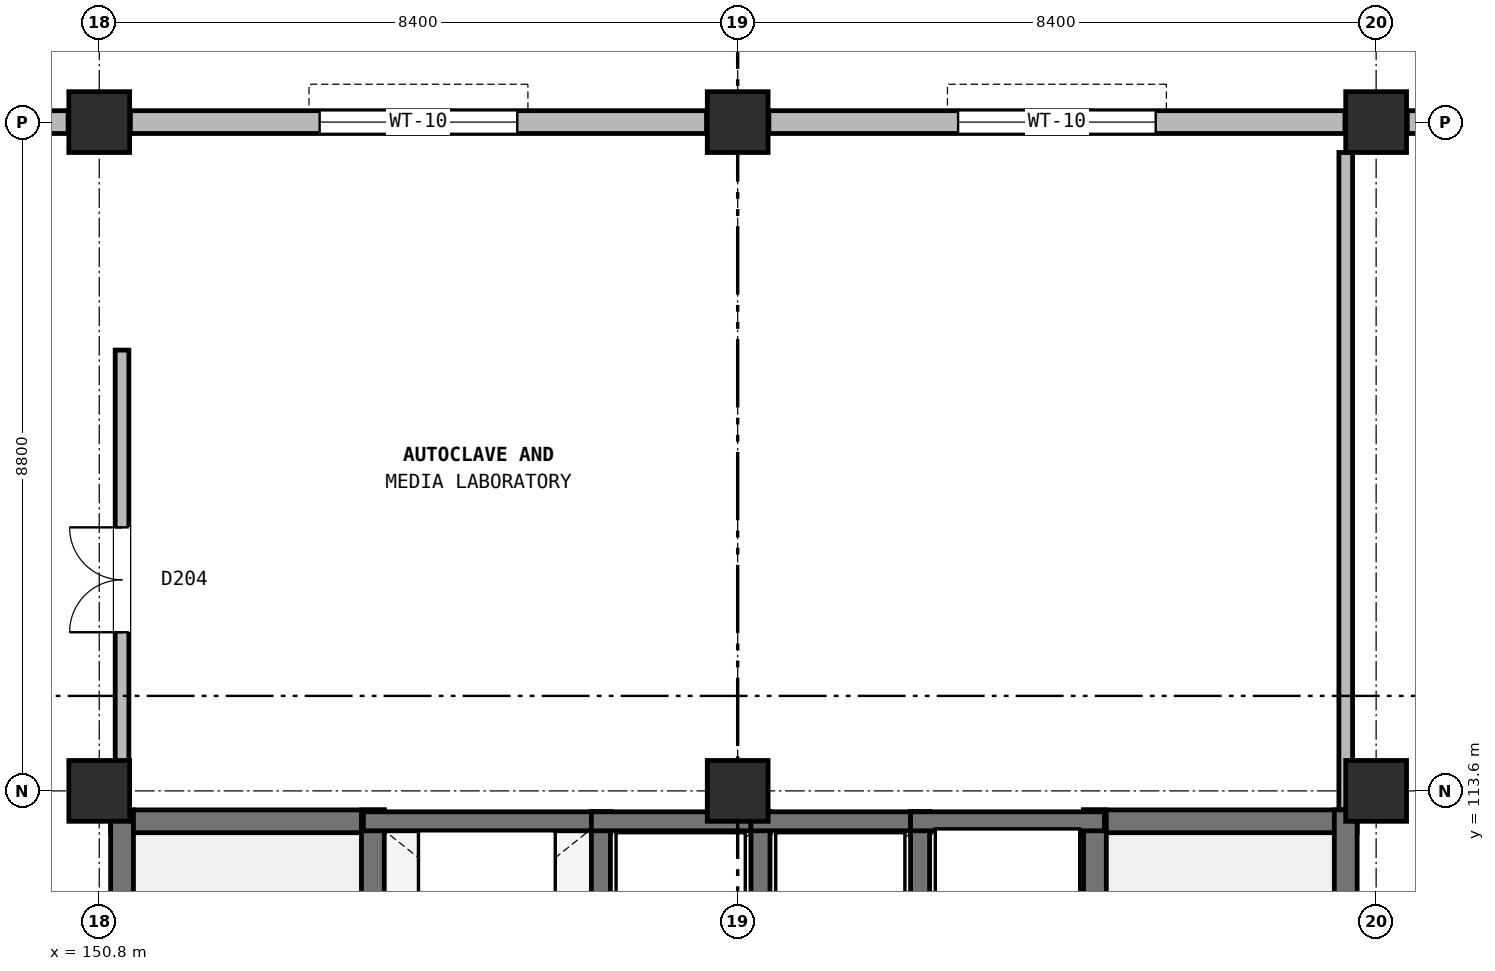
"""IFC4 building model, lengths in metres.
Left out: names, types, materials, properties, quantities, classifications, styles, units other than length and angle.
Written with IfcOpenShell. Run it as: python <this file> out.ifc"""

import sys

from ifc_helpers import new_model, si_unit, direction, frame, frame_2d, origin, origin_2d, place, context, subcontext, project, spatial, rectangle, extrude, element, fill, save


model = new_model("IFC4")
c1 = context("Model", 3, precision=1e-05, world=origin(), true_north=direction((0.0, 1.0)))
c2 = subcontext(c1, "Body", "Model", "MODEL_VIEW")
j1 = project(units=[si_unit("LENGTHUNIT", "METRE"), si_unit("PLANEANGLEUNIT", "RADIAN")], contexts=[c1])
p1 = place(None, origin())
s1 = spatial("IfcSite", under=j1, at=p1, CompositionType="ELEMENT")
p2 = place(p1, origin())
s2 = spatial("IfcBuilding", under=s1, at=p2, CompositionType="ELEMENT")
p3 = place(p2, frame((0.0, 0.0, 17.2)))
s3 = spatial("IfcBuildingStorey", under=s2, at=p3, CompositionType="ELEMENT", Elevation=17.2)
for number, where, z_axis, x_axis in (
    (1, (150.8, 113.6, 0.0), (0.0, 0.0, 1.0), (1.0, 0.0, 0.0)),
    (2, (150.8, 122.4, 0.0), (0.0, 0.0, 1.0), (1.0, 0.0, 0.0)),
    (3, (159.2, 113.6, 0.0), (0.0, 0.0, 1.0), (1.0, 0.0, 0.0)),
    (4, (159.2, 122.4, 0.0), (0.0, 0.0, 1.0), (1.0, 0.0, 0.0)),
    (5, (167.6, 113.6, 0.0), (0.0, 0.0, 1.0), (1.0, 0.0, 0.0)),
    (6, (167.6, 122.4, 0.0), (0.0, 0.0, 1.0), (1.0, 0.0, 0.0)),
):
    element("IfcColumn", number, at=place(p3, frame(where, z_axis=z_axis, x_axis=x_axis)), inside=s3, PredefinedType="COLUMN", context=c2, shape_type="SweptSolid", body=[
        extrude(rectangle(XDim=0.8, YDim=0.8, at=origin_2d()), origin(), (0.0, 0.0, 1.0), 3.8),
    ])
p4 = place(p3, frame((175.59, 122.4, 0.0), z_axis=(0.0, 0.0, 1.0), x_axis=(-1.0, 0.0, 0.0)))
e7 = element("IfcWall", 7, at=p4, inside=s3, PredefinedType="SOLIDWALL", context=c2, shape_type="SweptSolid", body=[
    extrude(rectangle(XDim=7.58, YDim=0.3, at=frame_2d((3.79, 0.0))), origin(), (0.0, 0.0, 1.0), 3.05),
])
p5 = place(p4, frame((0.695, 0.0, 0.9)))
e8 = element("IfcOpeningElement", 8, at=p5, cuts=e7, PredefinedType="OPENING", context=c2, shape_type="SweptSolid", body=[
    extrude(rectangle(XDim=2.6, YDim=2.0, at=frame_2d((1.3, 1.0))), frame((0.0, 0.16, 0.0), z_axis=(0.0, -1.0, 0.0), x_axis=(1.0, 0.0, 0.0)), (0.0, 0.0, 1.0), 0.32),
])
p6 = place(p3, frame((167.19, 122.4, 0.0), z_axis=(0.0, 0.0, 1.0), x_axis=(-1.0, 0.0, 0.0)))
e9 = element("IfcWall", 9, at=p6, inside=s3, PredefinedType="SOLIDWALL", context=c2, shape_type="SweptSolid", body=[
    extrude(rectangle(XDim=7.58, YDim=0.3, at=frame_2d((3.79, 0.0))), origin(), (0.0, 0.0, 1.0), 3.05),
])
p7 = place(p6, frame((2.49, 0.0, 0.9)))
e10 = element("IfcOpeningElement", 10, at=p7, cuts=e9, PredefinedType="OPENING", context=c2, shape_type="SweptSolid", body=[
    extrude(rectangle(XDim=2.6, YDim=2.0, at=frame_2d((1.3, 1.0))), frame((0.0, 0.16, 0.0), z_axis=(0.0, -1.0, 0.0), x_axis=(1.0, 0.0, 0.0)), (0.0, 0.0, 1.0), 0.32),
])
p8 = place(p3, frame((158.79, 122.4, 0.0), z_axis=(0.0, 0.0, 1.0), x_axis=(-1.0, 0.0, 0.0)))
e11 = element("IfcWall", 11, at=p8, inside=s3, PredefinedType="SOLIDWALL", context=c2, shape_type="SweptSolid", body=[
    extrude(rectangle(XDim=7.58, YDim=0.3, at=frame_2d((3.79, 0.0))), origin(), (0.0, 0.0, 1.0), 3.05),
])
p9 = place(p8, frame((2.49, 0.0, 0.9)))
e12 = element("IfcOpeningElement", 12, at=p9, cuts=e11, PredefinedType="OPENING", context=c2, shape_type="SweptSolid", body=[
    extrude(rectangle(XDim=2.6, YDim=2.0, at=frame_2d((1.3, 1.0))), frame((0.0, 0.16, 0.0), z_axis=(0.0, -1.0, 0.0), x_axis=(1.0, 0.0, 0.0)), (0.0, 0.0, 1.0), 0.32),
])
p10 = place(p3, frame((150.39, 122.4, 0.0), z_axis=(0.0, 0.0, 1.0), x_axis=(-1.0, 0.0, 0.0)))
e13 = element("IfcWall", 13, at=p10, inside=s3, PredefinedType="SOLIDWALL", context=c2, shape_type="SweptSolid", body=[
    extrude(rectangle(XDim=7.58, YDim=0.3, at=frame_2d((3.79, 0.0))), origin(), (0.0, 0.0, 1.0), 3.05),
])
p11 = place(p10, frame((2.49, 0.0, 0.9)))
e14 = element("IfcOpeningElement", 14, at=p11, cuts=e13, PredefinedType="OPENING", context=c2, shape_type="SweptSolid", body=[
    extrude(rectangle(XDim=2.6, YDim=2.0, at=frame_2d((1.3, 1.0))), frame((0.0, 0.16, 0.0), z_axis=(0.0, -1.0, 0.0), x_axis=(1.0, 0.0, 0.0)), (0.0, 0.0, 1.0), 0.32),
])
p12 = place(p3, frame((150.95, 113.2, 0.0), z_axis=(0.0, 0.0, 1.0), x_axis=(1.0, 0.0, 0.0)))
e15 = element("IfcWall", 15, at=p12, inside=s3, PredefinedType="SHEAR", context=c2, shape_type="SweptSolid", body=[
    extrude(rectangle(XDim=3.6, YDim=0.3, at=frame_2d((1.8, 0.0))), origin(), (0.0, 0.0, 1.0), 3.8),
])
p13 = place(p3, frame((151.1, 105.05, 0.0), z_axis=(0.0, 0.0, 1.0), x_axis=(0.0, 1.0, 0.0)))
e16 = element("IfcWall", 16, at=p13, inside=s3, PredefinedType="SHEAR", context=c2, shape_type="SweptSolid", body=[
    extrude(rectangle(XDim=8.3, YDim=0.3, at=frame_2d((4.15, 0.0))), origin(), (0.0, 0.0, 1.0), 3.8),
])
p14 = place(p3, frame((154.4, 105.05, 0.0), z_axis=(0.0, 0.0, 1.0), x_axis=(0.0, 1.0, 0.0)))
e17 = element("IfcWall", 17, at=p14, inside=s3, PredefinedType="SHEAR", context=c2, shape_type="SweptSolid", body=[
    extrude(rectangle(XDim=8.3, YDim=0.3, at=frame_2d((4.15, 0.0))), origin(), (0.0, 0.0, 1.0), 3.8),
])
p15 = place(p14, frame((0.45, 0.0, 0.0)))
e18 = element("IfcOpeningElement", 18, at=p15, cuts=e17, PredefinedType="OPENING", context=c2, shape_type="SweptSolid", body=[
    extrude(rectangle(XDim=1.1, YDim=2.2, at=frame_2d((0.55, 1.1))), frame((0.0, 0.16, 0.0), z_axis=(0.0, -1.0, 0.0), x_axis=(1.0, 0.0, 0.0)), (0.0, 0.0, 1.0), 0.32),
])
p16 = place(p3, frame((163.75, 113.2, 0.0), z_axis=(0.0, 0.0, 1.0), x_axis=(1.0, 0.0, 0.0)))
e19 = element("IfcWall", 19, at=p16, inside=s3, PredefinedType="SHEAR", context=c2, shape_type="SweptSolid", body=[
    extrude(rectangle(XDim=3.6, YDim=0.3, at=frame_2d((1.8, 0.0))), origin(), (0.0, 0.0, 1.0), 3.8),
])
for number, where, z_axis, x_axis in (
    (20, (163.9, 105.05, 0.0), (0.0, 0.0, 1.0), (0.0, 1.0, 0.0)),
    (21, (167.2, 105.05, 0.0), (0.0, 0.0, 1.0), (0.0, 1.0, 0.0)),
):
    element("IfcWall", number, at=place(p3, frame(where, z_axis=z_axis, x_axis=x_axis)), inside=s3, PredefinedType="SHEAR", context=c2, shape_type="SweptSolid", body=[
        extrude(rectangle(XDim=8.3, YDim=0.3, at=frame_2d((4.15, 0.0))), origin(), (0.0, 0.0, 1.0), 3.8),
    ])
p17 = place(p3, frame((154.275, 113.2, 0.0), z_axis=(0.0, 0.0, 1.0), x_axis=(1.0, 0.0, 0.0)))
e22 = element("IfcWall", 22, at=p17, inside=s3, PredefinedType="SOLIDWALL", context=c2, shape_type="SweptSolid", body=[
    extrude(rectangle(XDim=3.25, YDim=0.25, at=frame_2d((1.625, 0.0))), origin(), (0.0, 0.0, 1.0), 3.48),
])
p18 = place(p3, frame((157.4, 110.675, 0.0), z_axis=(0.0, 0.0, 1.0), x_axis=(0.0, 1.0, 0.0)))
e23 = element("IfcWall", 23, at=p18, inside=s3, PredefinedType="SOLIDWALL", context=c2, shape_type="SweptSolid", body=[
    extrude(rectangle(XDim=2.65, YDim=0.25, at=frame_2d((1.325, 0.0))), origin(), (0.0, 0.0, 1.0), 3.48),
])
p19 = place(p3, frame((157.275, 113.2, 0.0), z_axis=(0.0, 0.0, 1.0), x_axis=(1.0, 0.0, 0.0)))
e24 = element("IfcWall", 24, at=p19, inside=s3, PredefinedType="SOLIDWALL", context=c2, shape_type="SweptSolid", body=[
    extrude(rectangle(XDim=2.35, YDim=0.25, at=frame_2d((1.175, 0.0))), origin(), (0.0, 0.0, 1.0), 3.48),
])
p20 = place(p3, frame((159.5, 110.675, 0.0), z_axis=(0.0, 0.0, 1.0), x_axis=(0.0, 1.0, 0.0)))
e25 = element("IfcWall", 25, at=p20, inside=s3, PredefinedType="SOLIDWALL", context=c2, shape_type="SweptSolid", body=[
    extrude(rectangle(XDim=2.65, YDim=0.25, at=frame_2d((1.325, 0.0))), origin(), (0.0, 0.0, 1.0), 3.48),
])
p21 = place(p3, frame((159.375, 113.2, 0.0), z_axis=(0.0, 0.0, 1.0), x_axis=(1.0, 0.0, 0.0)))
e26 = element("IfcWall", 26, at=p21, inside=s3, PredefinedType="SOLIDWALL", context=c2, shape_type="SweptSolid", body=[
    extrude(rectangle(XDim=2.35, YDim=0.25, at=frame_2d((1.175, 0.0))), origin(), (0.0, 0.0, 1.0), 3.48),
])
p22 = place(p3, frame((161.6, 110.675, 0.0), z_axis=(0.0, 0.0, 1.0), x_axis=(0.0, 1.0, 0.0)))
e27 = element("IfcWall", 27, at=p22, inside=s3, PredefinedType="SOLIDWALL", context=c2, shape_type="SweptSolid", body=[
    extrude(rectangle(XDim=2.65, YDim=0.25, at=frame_2d((1.325, 0.0))), origin(), (0.0, 0.0, 1.0), 3.48),
])
p23 = place(p3, frame((161.475, 113.2, 0.0), z_axis=(0.0, 0.0, 1.0), x_axis=(1.0, 0.0, 0.0)))
e28 = element("IfcWall", 28, at=p23, inside=s3, PredefinedType="SOLIDWALL", context=c2, shape_type="SweptSolid", body=[
    extrude(rectangle(XDim=2.55, YDim=0.25, at=frame_2d((1.275, 0.0))), origin(), (0.0, 0.0, 1.0), 3.48),
])
p24 = place(p3, frame((151.1, 113.355, 0.0), z_axis=(0.0, 0.0, 1.0), x_axis=(0.0, 1.0, 0.0)))
e29 = element("IfcWall", 29, at=p24, inside=s3, PredefinedType="PARTITIONING", context=c2, shape_type="SweptSolid", body=[
    extrude(rectangle(XDim=6.045, YDim=0.18, at=frame_2d((3.022, 0.0))), origin(), (0.0, 0.0, 1.0), 3.045),
])
p25 = place(p24, frame((2.333, 0.0, 0.0)))
e30 = element("IfcOpeningElement", 30, at=p25, cuts=e29, PredefinedType="OPENING", context=c2, shape_type="SweptSolid", body=[
    extrude(rectangle(XDim=1.38, YDim=2.2, at=frame_2d((0.69, 1.1))), frame((0.0, 0.1, 0.0), z_axis=(0.0, -1.0, 0.0), x_axis=(1.0, 0.0, 0.0)), (0.0, 0.0, 1.0), 0.2),
])
p26 = place(p3, frame((167.2, 113.355, 0.0), z_axis=(0.0, 0.0, 1.0), x_axis=(0.0, 1.0, 0.0)))
e31 = element("IfcWall", 31, at=p26, inside=s3, PredefinedType="PARTITIONING", context=c2, shape_type="SweptSolid", body=[
    extrude(rectangle(XDim=8.645, YDim=0.18, at=frame_2d((4.323, 0.0))), origin(), (0.0, 0.0, 1.0), 3.045),
])
p27 = place(p7, origin())
e32 = element("IfcWindow", 32, at=p27, inside=s3, PartitioningType="SINGLE_PANEL", PredefinedType="WINDOW", context=c2, shape_type="SweptSolid", body=[
    extrude(rectangle(XDim=2.6, YDim=2.0, at=frame_2d((1.3, 1.0))), frame((0.0, 0.03, 0.0), z_axis=(0.0, -1.0, 0.0), x_axis=(1.0, 0.0, 0.0)), (0.0, 0.0, 1.0), 0.06),
])
fill(e10, e32)
p28 = place(p9, origin())
e33 = element("IfcWindow", 33, at=p28, inside=s3, PartitioningType="SINGLE_PANEL", PredefinedType="WINDOW", context=c2, shape_type="SweptSolid", body=[
    extrude(rectangle(XDim=2.6, YDim=2.0, at=frame_2d((1.3, 1.0))), frame((0.0, 0.03, 0.0), z_axis=(0.0, -1.0, 0.0), x_axis=(1.0, 0.0, 0.0)), (0.0, 0.0, 1.0), 0.06),
])
fill(e12, e33)
p29 = place(p25, origin())
e34 = element("IfcDoor", 34, at=p29, inside=s3, OperationType="DOUBLE_DOOR_SINGLE_SWING", PredefinedType="DOOR", context=c2, shape_type="SweptSolid", body=[
    extrude(rectangle(XDim=1.38, YDim=2.2, at=frame_2d((0.69, 1.1))), frame((0.0, 0.025, 0.0), z_axis=(0.0, -1.0, 0.0), x_axis=(1.0, 0.0, 0.0)), (0.0, 0.0, 1.0), 0.05),
])
fill(e30, e34)
save(model, sys.argv[1])
